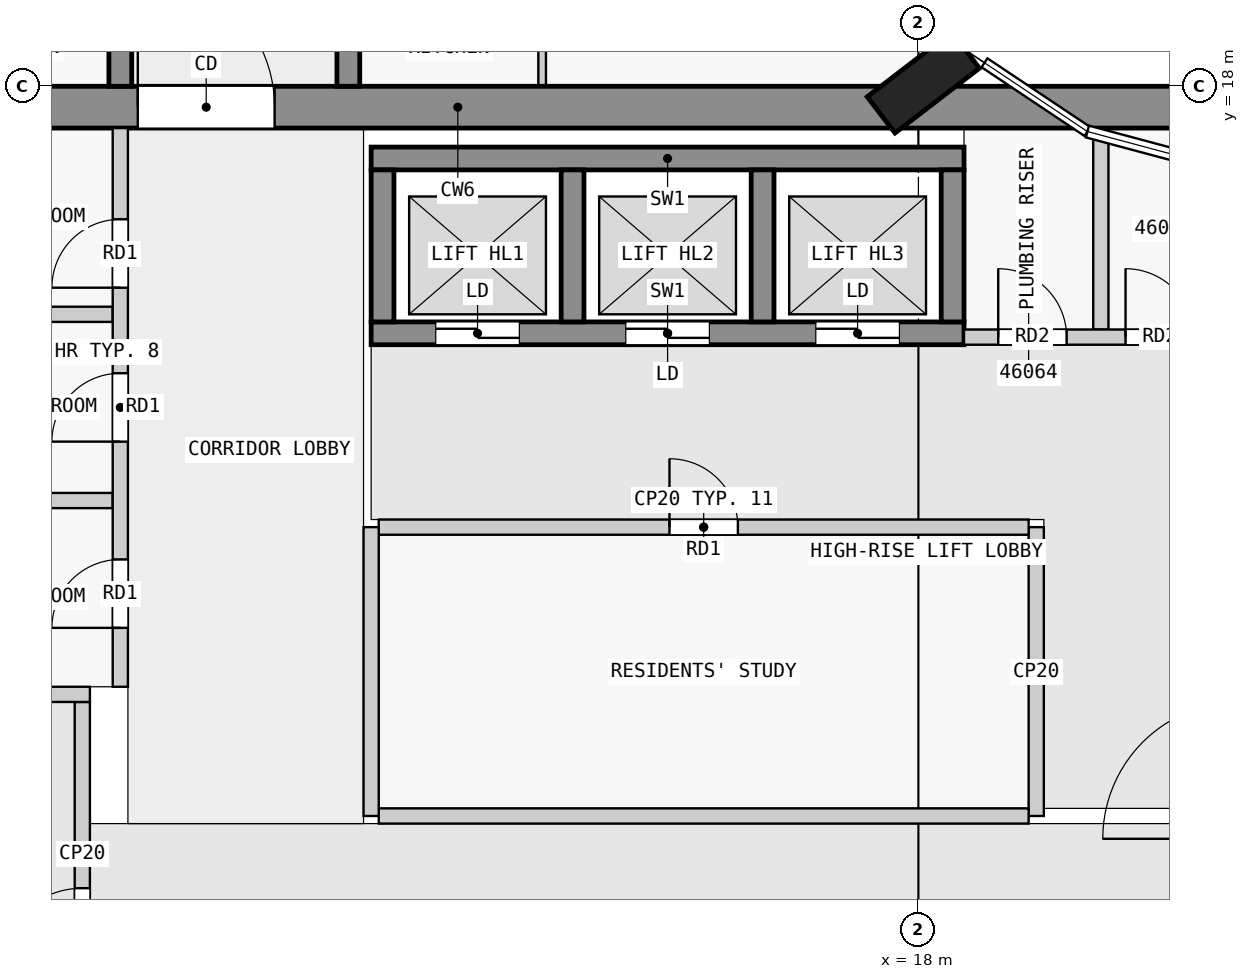
"""IFC4 building model, lengths in metres.
Left out: names, types, materials, properties, quantities, classifications, styles, units other than length and angle.
Written with IfcOpenShell. Run it as: python <this file> out.ifc"""

import sys

from ifc_helpers import new_model, si_unit, direction, frame, frame_2d, origin, origin_2d, place, context, subcontext, project, spatial, rectangle, extrude, element, fill, save


model = new_model("IFC4")
c1 = context("Model", 3, precision=1e-05, world=origin(), true_north=direction((0.0, 1.0)))
c2 = subcontext(c1, "Body", "Model", "MODEL_VIEW")
j1 = project(units=[si_unit("LENGTHUNIT", "METRE"), si_unit("PLANEANGLEUNIT", "RADIAN")], contexts=[c1])
p1 = place(None, origin())
s1 = spatial("IfcSite", under=j1, at=p1, CompositionType="ELEMENT")
p2 = place(p1, origin())
s2 = spatial("IfcBuilding", under=s1, at=p2, CompositionType="ELEMENT")
p3 = place(p2, frame((0.0, 0.0, 177.9)))
s3 = spatial("IfcBuildingStorey", under=s2, at=p3, CompositionType="ELEMENT", Elevation=177.9)
p4 = place(p3, frame((18.065, 18.05, 0.0), z_axis=(0.0, 0.0, 1.0), x_axis=(-0.608810846443, 0.793315418515, 0.0)))
e1 = element("IfcColumn", 1, at=p4, inside=s3, PredefinedType="COLUMN", context=c2, shape_type="SweptSolid", body=[
    extrude(rectangle(XDim=0.6, YDim=1.4, at=origin_2d()), origin(), (0.0, 0.0, 1.0), 3.5),
])
p5 = place(p3, frame((1.38, 17.725, 0.0), z_axis=(0.0, 0.0, 1.0), x_axis=(1.0, 0.0, 0.0)))
e2 = element("IfcWall", 2, at=p5, inside=s3, PredefinedType="SHEAR", context=c2, shape_type="SweptSolid", body=[
    extrude(rectangle(XDim=21.12, YDim=0.55, at=frame_2d((10.56, 0.0))), origin(), (0.0, 0.0, 1.0), 3.25),
])
p6 = place(p5, frame((6.35, 0.0, 0.0)))
e3 = element("IfcOpeningElement", 3, at=p6, cuts=e2, PredefinedType="OPENING", context=c2, shape_type="SweptSolid", body=[
    extrude(rectangle(XDim=1.8, YDim=2.1, at=frame_2d((0.9, 1.05))), frame((0.0, 0.285, 0.0), z_axis=(0.0, -1.0, 0.0), x_axis=(1.0, 0.0, 0.0)), (0.0, 0.0, 1.0), 0.57),
])
p7 = place(p3, frame((10.8, 17.05, 0.0), z_axis=(0.0, 0.0, 1.0), x_axis=(1.0, 0.0, 0.0)))
e4 = element("IfcWall", 4, at=p7, inside=s3, PredefinedType="SHEAR", context=c2, shape_type="SweptSolid", body=[
    extrude(rectangle(XDim=7.8, YDim=0.3, at=frame_2d((3.9, 0.0))), origin(), (0.0, 0.0, 1.0), 3.25),
])
p8 = place(p3, frame((10.8, 14.75, 0.0), z_axis=(0.0, 0.0, 1.0), x_axis=(1.0, 0.0, 0.0)))
e5 = element("IfcWall", 5, at=p8, inside=s3, PredefinedType="SHEAR", context=c2, shape_type="SweptSolid", body=[
    extrude(rectangle(XDim=7.8, YDim=0.3, at=frame_2d((3.9, 0.0))), origin(), (0.0, 0.0, 1.0), 3.25),
])
p9 = place(p8, frame((0.85, 0.0, 0.0)))
e6 = element("IfcOpeningElement", 6, at=p9, cuts=e5, PredefinedType="OPENING", context=c2, shape_type="SweptSolid", body=[
    extrude(rectangle(XDim=1.1, YDim=2.1, at=frame_2d((0.55, 1.05))), frame((0.0, 0.16, 0.0), z_axis=(0.0, -1.0, 0.0), x_axis=(1.0, 0.0, 0.0)), (0.0, 0.0, 1.0), 0.32),
])
p10 = place(p8, frame((3.35, 0.0, 0.0)))
e7 = element("IfcOpeningElement", 7, at=p10, cuts=e5, PredefinedType="OPENING", context=c2, shape_type="SweptSolid", body=[
    extrude(rectangle(XDim=1.1, YDim=2.1, at=frame_2d((0.55, 1.05))), frame((0.0, 0.16, 0.0), z_axis=(0.0, -1.0, 0.0), x_axis=(1.0, 0.0, 0.0)), (0.0, 0.0, 1.0), 0.32),
])
p11 = place(p8, frame((5.85, 0.0, 0.0)))
e8 = element("IfcOpeningElement", 8, at=p11, cuts=e5, PredefinedType="OPENING", context=c2, shape_type="SweptSolid", body=[
    extrude(rectangle(XDim=1.1, YDim=2.1, at=frame_2d((0.55, 1.05))), frame((0.0, 0.16, 0.0), z_axis=(0.0, -1.0, 0.0), x_axis=(1.0, 0.0, 0.0)), (0.0, 0.0, 1.0), 0.32),
])
for number, where, z_axis, x_axis in (
    (9, (10.95, 14.9, 0.0), (0.0, 0.0, 1.0), (0.0, 1.0, 0.0)),
    (10, (13.45, 14.9, 0.0), (0.0, 0.0, 1.0), (0.0, 1.0, 0.0)),
    (11, (15.95, 14.9, 0.0), (0.0, 0.0, 1.0), (0.0, 1.0, 0.0)),
    (12, (18.45, 14.9, 0.0), (0.0, 0.0, 1.0), (0.0, 1.0, 0.0)),
):
    element("IfcWall", number, at=place(p3, frame(where, z_axis=z_axis, x_axis=x_axis)), inside=s3, PredefinedType="SHEAR", context=c2, shape_type="SweptSolid", body=[
        extrude(rectangle(XDim=2.0, YDim=0.3, at=frame_2d((1.0, 0.0))), origin(), (0.0, 0.0, 1.0), 3.25),
    ])
p12 = place(p3, frame((7.5, 18.0, 0.0), z_axis=(0.0, 0.0, 1.0), x_axis=(0.0, 1.0, 0.0)))
e13 = element("IfcWall", 13, at=p12, inside=s3, PredefinedType="SHEAR", context=c2, shape_type="SweptSolid", body=[
    extrude(rectangle(XDim=27.0, YDim=0.3, at=frame_2d((13.5, 0.0))), origin(), (0.0, 0.0, 1.0), 3.25),
])
p13 = place(p12, frame((1.75, 0.0, 0.0)))
e14 = element("IfcOpeningElement", 14, at=p13, cuts=e13, PredefinedType="OPENING", context=c2, shape_type="SweptSolid", body=[
    extrude(rectangle(XDim=1.0, YDim=2.1, at=frame_2d((0.5, 1.05))), frame((0.0, 0.16, 0.0), z_axis=(0.0, -1.0, 0.0), x_axis=(1.0, 0.0, 0.0)), (0.0, 0.0, 1.0), 0.32),
])
p14 = place(p12, frame((5.85, 0.0, 0.0)))
e15 = element("IfcOpeningElement", 15, at=p14, cuts=e13, PredefinedType="OPENING", context=c2, shape_type="SweptSolid", body=[
    extrude(rectangle(XDim=1.8, YDim=2.1, at=frame_2d((0.9, 1.05))), frame((0.0, 0.16, 0.0), z_axis=(0.0, -1.0, 0.0), x_axis=(1.0, 0.0, 0.0)), (0.0, 0.0, 1.0), 0.32),
])
p15 = place(p12, frame((13.05, 0.0, 0.0)))
e16 = element("IfcOpeningElement", 16, at=p15, cuts=e13, PredefinedType="OPENING", context=c2, shape_type="SweptSolid", body=[
    extrude(rectangle(XDim=1.0, YDim=2.1, at=frame_2d((0.5, 1.05))), frame((0.0, 0.16, 0.0), z_axis=(0.0, -1.0, 0.0), x_axis=(1.0, 0.0, 0.0)), (0.0, 0.0, 1.0), 0.32),
])
p16 = place(p12, frame((21.35, 0.0, 0.0)))
e17 = element("IfcOpeningElement", 17, at=p16, cuts=e13, PredefinedType="OPENING", context=c2, shape_type="SweptSolid", body=[
    extrude(rectangle(XDim=1.0, YDim=2.1, at=frame_2d((0.5, 1.05))), frame((0.0, 0.16, 0.0), z_axis=(0.0, -1.0, 0.0), x_axis=(1.0, 0.0, 0.0)), (0.0, 0.0, 1.0), 0.32),
])
p17 = place(p3, frame((10.5, 18.0, 0.0), z_axis=(0.0, 0.0, 1.0), x_axis=(0.0, 1.0, 0.0)))
e18 = element("IfcWall", 18, at=p17, inside=s3, PredefinedType="SHEAR", context=c2, shape_type="SweptSolid", body=[
    extrude(rectangle(XDim=27.0, YDim=0.3, at=frame_2d((13.5, 0.0))), origin(), (0.0, 0.0, 1.0), 3.25),
])
p18 = place(p17, frame((1.75, 0.0, 0.0)))
e19 = element("IfcOpeningElement", 19, at=p18, cuts=e18, PredefinedType="OPENING", context=c2, shape_type="SweptSolid", body=[
    extrude(rectangle(XDim=1.0, YDim=2.1, at=frame_2d((0.5, 1.05))), frame((0.0, 0.16, 0.0), z_axis=(0.0, -1.0, 0.0), x_axis=(1.0, 0.0, 0.0)), (0.0, 0.0, 1.0), 0.32),
])
p19 = place(p17, frame((6.25, 0.0, 0.0)))
e20 = element("IfcOpeningElement", 20, at=p19, cuts=e18, PredefinedType="OPENING", context=c2, shape_type="SweptSolid", body=[
    extrude(rectangle(XDim=1.0, YDim=2.1, at=frame_2d((0.5, 1.05))), frame((0.0, 0.16, 0.0), z_axis=(0.0, -1.0, 0.0), x_axis=(1.0, 0.0, 0.0)), (0.0, 0.0, 1.0), 0.32),
])
p20 = place(p17, frame((10.75, 0.0, 0.0)))
e21 = element("IfcOpeningElement", 21, at=p20, cuts=e18, PredefinedType="OPENING", context=c2, shape_type="SweptSolid", body=[
    extrude(rectangle(XDim=1.0, YDim=2.1, at=frame_2d((0.5, 1.05))), frame((0.0, 0.16, 0.0), z_axis=(0.0, -1.0, 0.0), x_axis=(1.0, 0.0, 0.0)), (0.0, 0.0, 1.0), 0.32),
])
p21 = place(p17, frame((15.25, 0.0, 0.0)))
e22 = element("IfcOpeningElement", 22, at=p21, cuts=e18, PredefinedType="OPENING", context=c2, shape_type="SweptSolid", body=[
    extrude(rectangle(XDim=1.0, YDim=2.1, at=frame_2d((0.5, 1.05))), frame((0.0, 0.16, 0.0), z_axis=(0.0, -1.0, 0.0), x_axis=(1.0, 0.0, 0.0)), (0.0, 0.0, 1.0), 0.32),
])
p22 = place(p17, frame((19.75, 0.0, 0.0)))
e23 = element("IfcOpeningElement", 23, at=p22, cuts=e18, PredefinedType="OPENING", context=c2, shape_type="SweptSolid", body=[
    extrude(rectangle(XDim=1.0, YDim=2.1, at=frame_2d((0.5, 1.05))), frame((0.0, 0.16, 0.0), z_axis=(0.0, -1.0, 0.0), x_axis=(1.0, 0.0, 0.0)), (0.0, 0.0, 1.0), 0.32),
])
p23 = place(p17, frame((23.25, 0.0, 0.0)))
e24 = element("IfcOpeningElement", 24, at=p23, cuts=e18, PredefinedType="OPENING", context=c2, shape_type="SweptSolid", body=[
    extrude(rectangle(XDim=0.9, YDim=2.1, at=frame_2d((0.45, 1.05))), frame((0.0, 0.16, 0.0), z_axis=(0.0, -1.0, 0.0), x_axis=(1.0, 0.0, 0.0)), (0.0, 0.0, 1.0), 0.32),
])
p24 = place(p17, frame((25.45, 0.0, 0.0)))
e25 = element("IfcOpeningElement", 25, at=p24, cuts=e18, PredefinedType="OPENING", context=c2, shape_type="SweptSolid", body=[
    extrude(rectangle(XDim=1.0, YDim=2.1, at=frame_2d((0.5, 1.05))), frame((0.0, 0.16, 0.0), z_axis=(0.0, -1.0, 0.0), x_axis=(1.0, 0.0, 0.0)), (0.0, 0.0, 1.0), 0.32),
])
p25 = place(p3, frame((7.0, 5.9, 0.0), z_axis=(0.0, 0.0, 1.0), x_axis=(0.0, 1.0, 0.0)))
e26 = element("IfcWall", 26, at=p25, inside=s3, PredefinedType="PARTITIONING", context=c2, shape_type="SweptSolid", body=[
    extrude(rectangle(XDim=4.0, YDim=0.2, at=frame_2d((2.0, 0.0))), origin(), (0.0, 0.0, 1.0), 3.25),
])
p26 = place(p25, frame((0.45, 0.0, 0.0)))
e27 = element("IfcOpeningElement", 27, at=p26, cuts=e26, PredefinedType="OPENING", context=c2, shape_type="SweptSolid", body=[
    extrude(rectangle(XDim=1.1, YDim=2.1, at=frame_2d((0.55, 1.05))), frame((0.0, 0.11, 0.0), z_axis=(0.0, -1.0, 0.0), x_axis=(1.0, 0.0, 0.0)), (0.0, 0.0, 1.0), 0.22),
])
p27 = place(p3, frame((5.15, 10.0, 0.0), z_axis=(0.0, 0.0, 1.0), x_axis=(1.0, 0.0, 0.0)))
e28 = element("IfcWall", 28, at=p27, inside=s3, PredefinedType="PARTITIONING", context=c2, shape_type="SweptSolid", body=[
    extrude(rectangle(XDim=1.95, YDim=0.2, at=frame_2d((0.975, 0.0))), origin(), (0.0, 0.0, 1.0), 3.25),
])
p28 = place(p3, frame((10.8, 8.4, 0.0), z_axis=(0.0, 0.0, 1.0), x_axis=(0.0, 1.0, 0.0)))
e29 = element("IfcWall", 29, at=p28, inside=s3, PredefinedType="PARTITIONING", context=c2, shape_type="SweptSolid", body=[
    extrude(rectangle(XDim=3.8, YDim=0.2, at=frame_2d((1.9, 0.0))), origin(), (0.0, 0.0, 1.0), 3.25),
])
p29 = place(p3, frame((10.9, 8.4, 0.0), z_axis=(0.0, 0.0, 1.0), x_axis=(1.0, 0.0, 0.0)))
e30 = element("IfcWall", 30, at=p29, inside=s3, PredefinedType="PARTITIONING", context=c2, shape_type="SweptSolid", body=[
    extrude(rectangle(XDim=8.55, YDim=0.2, at=frame_2d((4.275, 0.0))), origin(), (0.0, 0.0, 1.0), 3.25),
])
p30 = place(p3, frame((19.55, 8.4, 0.0), z_axis=(0.0, 0.0, 1.0), x_axis=(0.0, 1.0, 0.0)))
e31 = element("IfcWall", 31, at=p30, inside=s3, PredefinedType="PARTITIONING", context=c2, shape_type="SweptSolid", body=[
    extrude(rectangle(XDim=3.8, YDim=0.2, at=frame_2d((1.9, 0.0))), origin(), (0.0, 0.0, 1.0), 3.25),
])
p31 = place(p3, frame((10.9, 12.2, 0.0), z_axis=(0.0, 0.0, 1.0), x_axis=(1.0, 0.0, 0.0)))
e32 = element("IfcWall", 32, at=p31, inside=s3, PredefinedType="PARTITIONING", context=c2, shape_type="SweptSolid", body=[
    extrude(rectangle(XDim=8.55, YDim=0.2, at=frame_2d((4.275, 0.0))), origin(), (0.0, 0.0, 1.0), 3.25),
])
p32 = place(p31, frame((3.825, 0.0, 0.0)))
e33 = element("IfcOpeningElement", 33, at=p32, cuts=e32, PredefinedType="OPENING", context=c2, shape_type="SweptSolid", body=[
    extrude(rectangle(XDim=0.9, YDim=2.1, at=frame_2d((0.45, 1.05))), frame((0.0, 0.11, 0.0), z_axis=(0.0, -1.0, 0.0), x_axis=(1.0, 0.0, 0.0)), (0.0, 0.0, 1.0), 0.22),
])
p33 = place(p3, frame((7.5, 10.1, 0.0), z_axis=(0.0, 0.0, 1.0), x_axis=(0.0, 1.0, 0.0)))
e34 = element("IfcWall", 34, at=p33, inside=s3, PredefinedType="PARTITIONING", context=c2, shape_type="SweptSolid", body=[
    extrude(rectangle(XDim=7.35, YDim=0.2, at=frame_2d((3.675, 0.0))), origin(), (0.0, 0.0, 1.0), 3.25),
])
p34 = place(p33, frame((0.775, 0.0, 0.0)))
e35 = element("IfcOpeningElement", 35, at=p34, cuts=e34, PredefinedType="OPENING", context=c2, shape_type="SweptSolid", body=[
    extrude(rectangle(XDim=0.9, YDim=2.1, at=frame_2d((0.45, 1.05))), frame((0.0, 0.11, 0.0), z_axis=(0.0, -1.0, 0.0), x_axis=(1.0, 0.0, 0.0)), (0.0, 0.0, 1.0), 0.22),
])
p35 = place(p33, frame((3.225, 0.0, 0.0)))
e36 = element("IfcOpeningElement", 36, at=p35, cuts=e34, PredefinedType="OPENING", context=c2, shape_type="SweptSolid", body=[
    extrude(rectangle(XDim=0.9, YDim=2.1, at=frame_2d((0.45, 1.05))), frame((0.0, 0.11, 0.0), z_axis=(0.0, -1.0, 0.0), x_axis=(1.0, 0.0, 0.0)), (0.0, 0.0, 1.0), 0.22),
])
p36 = place(p33, frame((5.25, 0.0, 0.0)))
e37 = element("IfcOpeningElement", 37, at=p36, cuts=e34, PredefinedType="OPENING", context=c2, shape_type="SweptSolid", body=[
    extrude(rectangle(XDim=0.9, YDim=2.1, at=frame_2d((0.45, 1.05))), frame((0.0, 0.11, 0.0), z_axis=(0.0, -1.0, 0.0), x_axis=(1.0, 0.0, 0.0)), (0.0, 0.0, 1.0), 0.22),
])
for number, where, z_axis, x_axis in (
    (38, (5.15, 12.55, 0.0), (0.0, 0.0, 1.0), (1.0, 0.0, 0.0)),
    (39, (5.15, 15.0, 0.0), (0.0, 0.0, 1.0), (1.0, 0.0, 0.0)),
):
    element("IfcWall", number, at=place(p3, frame(where, z_axis=z_axis, x_axis=x_axis)), inside=s3, PredefinedType="PARTITIONING", context=c2, shape_type="SweptSolid", body=[
        extrude(rectangle(XDim=2.25, YDim=0.2, at=frame_2d((1.125, 0.0))), origin(), (0.0, 0.0, 1.0), 3.25),
    ])
p37 = place(p3, frame((18.6, 14.7, 0.0), z_axis=(0.0, 0.0, 1.0), x_axis=(1.0, 0.0, 0.0)))
e40 = element("IfcWall", 40, at=p37, inside=s3, PredefinedType="PARTITIONING", context=c2, shape_type="SweptSolid", body=[
    extrude(rectangle(XDim=3.35, YDim=0.2, at=frame_2d((1.675, 0.0))), origin(), (0.0, 0.0, 1.0), 3.25),
])
p38 = place(p37, frame((0.45, 0.0, 0.0)))
e41 = element("IfcOpeningElement", 41, at=p38, cuts=e40, PredefinedType="OPENING", context=c2, shape_type="SweptSolid", body=[
    extrude(rectangle(XDim=0.9, YDim=2.1, at=frame_2d((0.45, 1.05))), frame((0.0, 0.11, 0.0), z_axis=(0.0, -1.0, 0.0), x_axis=(1.0, 0.0, 0.0)), (0.0, 0.0, 1.0), 0.22),
])
p39 = place(p37, frame((2.125, 0.0, 0.0)))
e42 = element("IfcOpeningElement", 42, at=p39, cuts=e40, PredefinedType="OPENING", context=c2, shape_type="SweptSolid", body=[
    extrude(rectangle(XDim=0.9, YDim=2.1, at=frame_2d((0.45, 1.05))), frame((0.0, 0.11, 0.0), z_axis=(0.0, -1.0, 0.0), x_axis=(1.0, 0.0, 0.0)), (0.0, 0.0, 1.0), 0.22),
])
p40 = place(p3, frame((20.4, 14.8, 0.0), z_axis=(0.0, 0.0, 1.0), x_axis=(0.0, 1.0, 0.0)))
e43 = element("IfcWall", 43, at=p40, inside=s3, PredefinedType="PARTITIONING", context=c2, shape_type="SweptSolid", body=[
    extrude(rectangle(XDim=2.65, YDim=0.2, at=frame_2d((1.325, 0.0))), origin(), (0.0, 0.0, 1.0), 3.25),
])
p41 = place(p3, frame((13.05, 18.0, 0.0), z_axis=(0.0, 0.0, 1.0), x_axis=(0.0, 1.0, 0.0)))
e44 = element("IfcWall", 44, at=p41, inside=s3, PredefinedType="PARTITIONING", context=c2, shape_type="SweptSolid", body=[
    extrude(rectangle(XDim=1.45, YDim=0.1, at=frame_2d((0.725, 0.0))), origin(), (0.0, 0.0, 1.0), 3.25),
])
p42 = place(p26, origin())
e45 = element("IfcDoor", 45, at=p42, inside=s3, OperationType="SINGLE_SWING_LEFT", PredefinedType="DOOR", context=c2, shape_type="SweptSolid", body=[
    extrude(rectangle(XDim=1.1, YDim=2.1, at=frame_2d((0.55, 1.05))), frame((0.0, 0.025, 0.0), z_axis=(0.0, -1.0, 0.0), x_axis=(1.0, 0.0, 0.0)), (0.0, 0.0, 1.0), 0.05),
])
fill(e27, e45)
p43 = place(p32, origin())
e46 = element("IfcDoor", 46, at=p43, inside=s3, OperationType="SINGLE_SWING_LEFT", PredefinedType="DOOR", context=c2, shape_type="SweptSolid", body=[
    extrude(rectangle(XDim=0.9, YDim=2.1, at=frame_2d((0.45, 1.05))), frame((0.0, 0.025, 0.0), z_axis=(0.0, -1.0, 0.0), x_axis=(1.0, 0.0, 0.0)), (0.0, 0.0, 1.0), 0.05),
])
fill(e33, e46)
p44 = place(p9, origin())
e47 = element("IfcDoor", 47, at=p44, inside=s3, OperationType="DOUBLE_DOOR_SLIDING", PredefinedType="DOOR", context=c2, shape_type="SweptSolid", body=[
    extrude(rectangle(XDim=1.1, YDim=2.1, at=frame_2d((0.55, 1.05))), frame((0.0, 0.025, 0.0), z_axis=(0.0, -1.0, 0.0), x_axis=(1.0, 0.0, 0.0)), (0.0, 0.0, 1.0), 0.05),
])
fill(e6, e47)
p45 = place(p10, origin())
e48 = element("IfcDoor", 48, at=p45, inside=s3, OperationType="DOUBLE_DOOR_SLIDING", PredefinedType="DOOR", context=c2, shape_type="SweptSolid", body=[
    extrude(rectangle(XDim=1.1, YDim=2.1, at=frame_2d((0.55, 1.05))), frame((0.0, 0.025, 0.0), z_axis=(0.0, -1.0, 0.0), x_axis=(1.0, 0.0, 0.0)), (0.0, 0.0, 1.0), 0.05),
])
fill(e7, e48)
p46 = place(p11, origin())
e49 = element("IfcDoor", 49, at=p46, inside=s3, OperationType="DOUBLE_DOOR_SLIDING", PredefinedType="DOOR", context=c2, shape_type="SweptSolid", body=[
    extrude(rectangle(XDim=1.1, YDim=2.1, at=frame_2d((0.55, 1.05))), frame((0.0, 0.025, 0.0), z_axis=(0.0, -1.0, 0.0), x_axis=(1.0, 0.0, 0.0)), (0.0, 0.0, 1.0), 0.05),
])
fill(e8, e49)
p47 = place(p6, origin())
e50 = element("IfcDoor", 50, at=p47, inside=s3, OperationType="DOUBLE_DOOR_SINGLE_SWING", PredefinedType="DOOR", context=c2, shape_type="SweptSolid", body=[
    extrude(rectangle(XDim=1.8, YDim=2.1, at=frame_2d((0.9, 1.05))), frame((0.0, 0.025, 0.0), z_axis=(0.0, -1.0, 0.0), x_axis=(1.0, 0.0, 0.0)), (0.0, 0.0, 1.0), 0.05),
])
fill(e3, e50)
p48 = place(p34, origin())
e51 = element("IfcDoor", 51, at=p48, inside=s3, OperationType="SINGLE_SWING_RIGHT", PredefinedType="DOOR", context=c2, shape_type="SweptSolid", body=[
    extrude(rectangle(XDim=0.9, YDim=2.1, at=frame_2d((0.45, 1.05))), frame((0.0, 0.025, 0.0), z_axis=(0.0, -1.0, 0.0), x_axis=(1.0, 0.0, 0.0)), (0.0, 0.0, 1.0), 0.05),
])
fill(e35, e51)
p49 = place(p35, origin())
e52 = element("IfcDoor", 52, at=p49, inside=s3, OperationType="SINGLE_SWING_RIGHT", PredefinedType="DOOR", context=c2, shape_type="SweptSolid", body=[
    extrude(rectangle(XDim=0.9, YDim=2.1, at=frame_2d((0.45, 1.05))), frame((0.0, 0.025, 0.0), z_axis=(0.0, -1.0, 0.0), x_axis=(1.0, 0.0, 0.0)), (0.0, 0.0, 1.0), 0.05),
])
fill(e36, e52)
p50 = place(p36, origin())
e53 = element("IfcDoor", 53, at=p50, inside=s3, OperationType="SINGLE_SWING_RIGHT", PredefinedType="DOOR", context=c2, shape_type="SweptSolid", body=[
    extrude(rectangle(XDim=0.9, YDim=2.1, at=frame_2d((0.45, 1.05))), frame((0.0, 0.025, 0.0), z_axis=(0.0, -1.0, 0.0), x_axis=(1.0, 0.0, 0.0)), (0.0, 0.0, 1.0), 0.05),
])
fill(e37, e53)
p51 = place(p38, origin())
e54 = element("IfcDoor", 54, at=p51, inside=s3, OperationType="SINGLE_SWING_LEFT", PredefinedType="DOOR", context=c2, shape_type="SweptSolid", body=[
    extrude(rectangle(XDim=0.9, YDim=2.1, at=frame_2d((0.45, 1.05))), frame((0.0, 0.025, 0.0), z_axis=(0.0, -1.0, 0.0), x_axis=(1.0, 0.0, 0.0)), (0.0, 0.0, 1.0), 0.05),
])
fill(e41, e54)
p52 = place(p39, origin())
e55 = element("IfcDoor", 55, at=p52, inside=s3, OperationType="SINGLE_SWING_LEFT", PredefinedType="DOOR", context=c2, shape_type="SweptSolid", body=[
    extrude(rectangle(XDim=0.9, YDim=2.1, at=frame_2d((0.45, 1.05))), frame((0.0, 0.025, 0.0), z_axis=(0.0, -1.0, 0.0), x_axis=(1.0, 0.0, 0.0)), (0.0, 0.0, 1.0), 0.05),
])
fill(e42, e55)
save(model, sys.argv[1])
